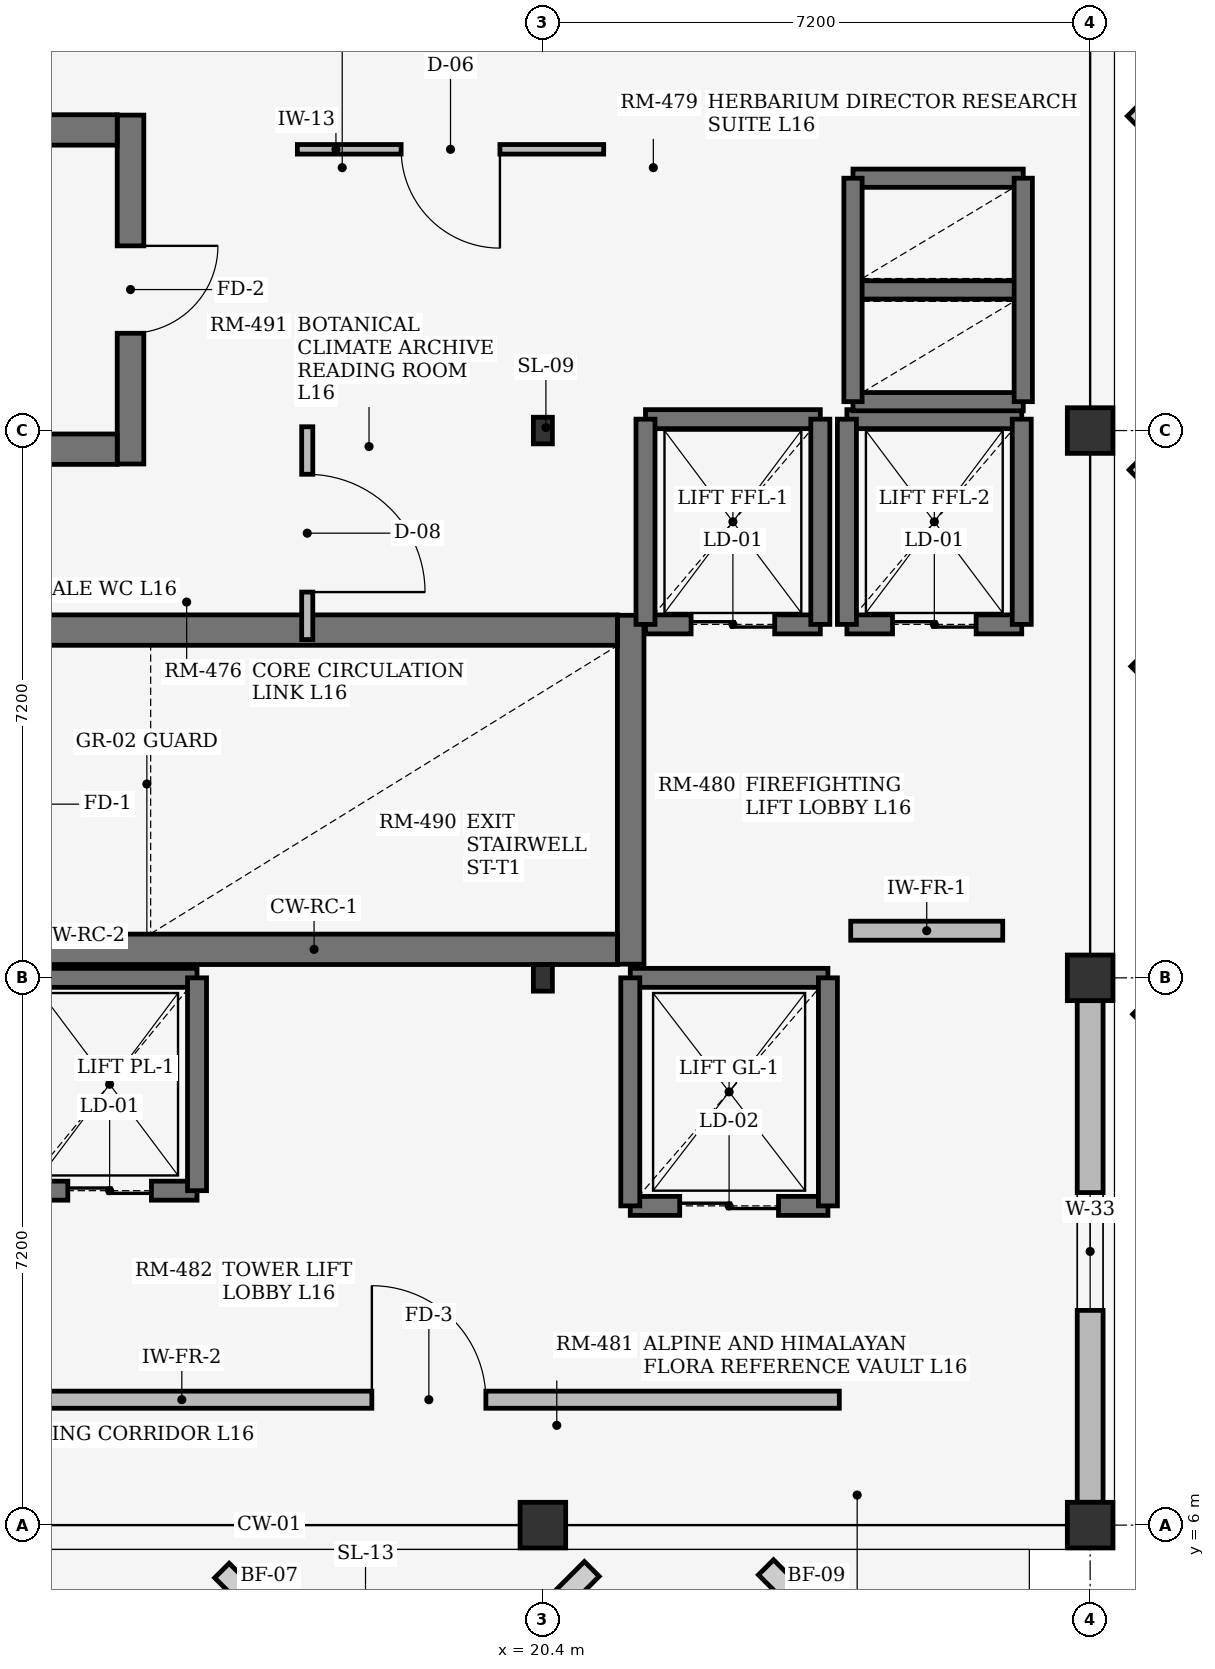
"""IFC4 building model, lengths in metres.
Left out: names, types, materials, properties, quantities, classifications, styles, units other than length and angle.
Written with IfcOpenShell. Run it as: python <this file> out.ifc"""

import sys

from ifc_helpers import new_model, si_unit, direction, frame, frame_2d, origin, origin_2d, place, context, subcontext, project, spatial, rectangle, i_section, extrude, element, fill, save


model = new_model("IFC4")
c1 = context("Model", 3, precision=1e-05, world=origin(), true_north=direction((0.0, 1.0)))
c2 = subcontext(c1, "Body", "Model", "MODEL_VIEW")
j1 = project(units=[si_unit("LENGTHUNIT", "METRE"), si_unit("PLANEANGLEUNIT", "RADIAN")], contexts=[c1])
p1 = place(None, origin())
s1 = spatial("IfcSite", under=j1, at=p1, CompositionType="ELEMENT")
p2 = place(p1, origin())
s2 = spatial("IfcBuilding", under=s1, at=p2, CompositionType="ELEMENT")
p3 = place(p2, frame((0.0, 0.0, 63.15)))
s3 = spatial("IfcBuildingStorey", under=s2, at=p3, CompositionType="ELEMENT", Elevation=63.15)
p4 = place(p3, frame((20.4, 6.0, 0.0), z_axis=(0.0, 0.0, 1.0), x_axis=(1.0, 0.0, 0.0)))
e1 = element("IfcColumn", 1, at=p4, inside=s3, PredefinedType="COLUMN", context=c2, shape_type="SweptSolid", body=[
    extrude(rectangle(XDim=0.6, YDim=0.6, at=origin_2d()), origin(), (0.0, 0.0, 1.0), 3.49),
])
for number, where, z_axis, x_axis in (
    (2, (20.4, 13.2, 0.0), (0.0, 0.0, 1.0), (1.0, 0.0, 0.0)),
    (3, (20.4, 20.4, 0.0), (0.0, 0.0, 1.0), (1.0, 0.0, 0.0)),
):
    element("IfcColumn", number, at=place(p3, frame(where, z_axis=z_axis, x_axis=x_axis)), inside=s3, PredefinedType="COLUMN", context=c2, shape_type="SweptSolid", body=[
        extrude(i_section(OverallWidth=0.25, OverallDepth=0.35, WebThickness=0.01, FlangeThickness=0.012, at=origin_2d()), origin(), (0.0, 0.0, 1.0), 3.49),
    ])
for number, where, z_axis, x_axis in (
    (4, (27.6, 6.0, 0.0), (0.0, 0.0, 1.0), (1.0, 0.0, 0.0)),
    (5, (27.6, 13.2, 0.0), (0.0, 0.0, 1.0), (1.0, 0.0, 0.0)),
    (6, (27.6, 20.4, 0.0), (0.0, 0.0, 1.0), (1.0, 0.0, 0.0)),
):
    element("IfcColumn", number, at=place(p3, frame(where, z_axis=z_axis, x_axis=x_axis)), inside=s3, PredefinedType="COLUMN", context=c2, shape_type="SweptSolid", body=[
        extrude(rectangle(XDim=0.6, YDim=0.6, at=origin_2d()), origin(), (0.0, 0.0, 1.0), 3.49),
    ])
p5 = place(p3, frame((27.6, 6.3, 0.0), z_axis=(0.0, 0.0, 1.0), x_axis=(0.0, 1.0, 0.0)))
e7 = element("IfcWall", 7, at=p5, inside=s3, PredefinedType="STANDARD", context=c2, shape_type="SweptSolid", body=[
    extrude(rectangle(XDim=6.6, YDim=0.34, at=frame_2d((3.3, 0.0))), origin(), (0.0, 0.0, 1.0), 3.07),
])
p6 = place(p5, frame((2.525, 0.0, 0.75)))
e8 = element("IfcOpeningElement", 8, at=p6, cuts=e7, PredefinedType="OPENING", context=c2, shape_type="SweptSolid", body=[
    extrude(rectangle(XDim=1.55, YDim=1.35, at=frame_2d((0.775, 0.675))), frame((0.0, 0.18, 0.0), z_axis=(0.0, -1.0, 0.0), x_axis=(1.0, 0.0, 0.0)), (0.0, 0.0, 1.0), 0.36),
])
p7 = place(p3, frame((21.555, 13.38, 0.0), z_axis=(0.0, 0.0, 1.0), x_axis=(0.0, 1.0, 0.0)))
e9 = element("IfcWall", 9, at=p7, inside=s3, PredefinedType="SHEAR", context=c2, shape_type="SweptSolid", body=[
    extrude(rectangle(XDim=4.59, YDim=0.35, at=frame_2d((2.295, 0.0))), origin(), (0.0, 0.0, 1.0), 3.49),
])
for number, where, z_axis, x_axis in (
    (10, (13.4, 13.575, 0.0), (0.0, 0.0, 1.0), (1.0, 0.0, 0.0)),
    (11, (13.4, 17.775, 0.0), (0.0, 0.0, 1.0), (1.0, 0.0, 0.0)),
):
    element("IfcWall", number, at=place(p3, frame(where, z_axis=z_axis, x_axis=x_axis)), inside=s3, PredefinedType="SHEAR", context=c2, shape_type="SweptSolid", body=[
        extrude(rectangle(XDim=7.98, YDim=0.4, at=frame_2d((3.99, 0.0))), origin(), (0.0, 0.0, 1.0), 3.49),
    ])
p8 = place(p3, frame((14.975, 24.55, 0.0), z_axis=(0.0, 0.0, 1.0), x_axis=(0.0, -1.0, 0.0)))
e12 = element("IfcWall", 12, at=p8, inside=s3, PredefinedType="SHEAR", context=c2, shape_type="SweptSolid", body=[
    extrude(rectangle(XDim=4.59, YDim=0.35, at=frame_2d((2.295, 0.0))), origin(), (0.0, 0.0, 1.0), 3.49),
])
p9 = place(p8, frame((1.72, 0.0, 0.0)))
e13 = element("IfcOpeningElement", 13, at=p9, cuts=e12, PredefinedType="OPENING", context=c2, shape_type="SweptSolid", body=[
    extrude(rectangle(XDim=1.15, YDim=2.2, at=frame_2d((0.575, 1.1))), frame((0.0, 0.185, 0.0), z_axis=(0.0, -1.0, 0.0), x_axis=(1.0, 0.0, 0.0)), (0.0, 0.0, 1.0), 0.37),
])
for number, where, z_axis, x_axis in (
    (14, (14.8, 24.355, 0.0), (0.0, 0.0, 1.0), (-1.0, 0.0, 0.0)),
    (15, (14.8, 20.155, 0.0), (0.0, 0.0, 1.0), (-1.0, 0.0, 0.0)),
):
    element("IfcWall", number, at=place(p3, frame(where, z_axis=z_axis, x_axis=x_axis)), inside=s3, PredefinedType="SHEAR", context=c2, shape_type="SweptSolid", body=[
        extrude(rectangle(XDim=7.98, YDim=0.4, at=frame_2d((3.99, 0.0))), origin(), (0.0, 0.0, 1.0), 3.49),
    ])
p10 = place(p3, frame((21.75, 17.85, 0.0), z_axis=(0.0, 0.0, 1.0), x_axis=(1.0, 0.0, 0.0)))
e16 = element("IfcWall", 16, at=p10, inside=s3, PredefinedType="SHEAR", context=c2, shape_type="SweptSolid", body=[
    extrude(rectangle(XDim=2.3, YDim=0.25, at=frame_2d((1.15, 0.0))), origin(), (0.0, 0.0, 1.0), 3.49),
])
p11 = place(p10, frame((0.6, 0.0, 0.0)))
e17 = element("IfcOpeningElement", 17, at=p11, cuts=e16, PredefinedType="OPENING", context=c2, shape_type="SweptSolid", body=[
    extrude(rectangle(XDim=1.1, YDim=2.2, at=frame_2d((0.55, 1.1))), frame((0.0, 0.135, 0.0), z_axis=(0.0, -1.0, 0.0), x_axis=(1.0, 0.0, 0.0)), (0.0, 0.0, 1.0), 0.27),
])
p12 = place(p3, frame((21.75, 20.55, 0.0), z_axis=(0.0, 0.0, 1.0), x_axis=(1.0, 0.0, 0.0)))
e18 = element("IfcWall", 18, at=p12, inside=s3, PredefinedType="SHEAR", context=c2, shape_type="SweptSolid", body=[
    extrude(rectangle(XDim=2.3, YDim=0.25, at=frame_2d((1.15, 0.0))), origin(), (0.0, 0.0, 1.0), 3.49),
])
for number, where, z_axis, x_axis in (
    (19, (21.75, 17.85, 0.0), (0.0, 0.0, 1.0), (0.0, 1.0, 0.0)),
    (20, (24.05, 17.85, 0.0), (0.0, 0.0, 1.0), (0.0, 1.0, 0.0)),
):
    element("IfcWall", number, at=place(p3, frame(where, z_axis=z_axis, x_axis=x_axis)), inside=s3, PredefinedType="SHEAR", context=c2, shape_type="SweptSolid", body=[
        extrude(rectangle(XDim=2.7, YDim=0.25, at=frame_2d((1.35, 0.0))), origin(), (0.0, 0.0, 1.0), 3.49),
    ])
p13 = place(p3, frame((24.4, 17.85, 0.0), z_axis=(0.0, 0.0, 1.0), x_axis=(1.0, 0.0, 0.0)))
e21 = element("IfcWall", 21, at=p13, inside=s3, PredefinedType="SHEAR", context=c2, shape_type="SweptSolid", body=[
    extrude(rectangle(XDim=2.3, YDim=0.25, at=frame_2d((1.15, 0.0))), origin(), (0.0, 0.0, 1.0), 3.49),
])
p14 = place(p13, frame((0.6, 0.0, 0.0)))
e22 = element("IfcOpeningElement", 22, at=p14, cuts=e21, PredefinedType="OPENING", context=c2, shape_type="SweptSolid", body=[
    extrude(rectangle(XDim=1.1, YDim=2.2, at=frame_2d((0.55, 1.1))), frame((0.0, 0.135, 0.0), z_axis=(0.0, -1.0, 0.0), x_axis=(1.0, 0.0, 0.0)), (0.0, 0.0, 1.0), 0.27),
])
p15 = place(p3, frame((24.4, 20.55, 0.0), z_axis=(0.0, 0.0, 1.0), x_axis=(1.0, 0.0, 0.0)))
e23 = element("IfcWall", 23, at=p15, inside=s3, PredefinedType="SHEAR", context=c2, shape_type="SweptSolid", body=[
    extrude(rectangle(XDim=2.3, YDim=0.25, at=frame_2d((1.15, 0.0))), origin(), (0.0, 0.0, 1.0), 3.49),
])
for number, where, z_axis, x_axis in (
    (24, (24.4, 17.85, 0.0), (0.0, 0.0, 1.0), (0.0, 1.0, 0.0)),
    (25, (26.7, 17.85, 0.0), (0.0, 0.0, 1.0), (0.0, 1.0, 0.0)),
):
    element("IfcWall", number, at=place(p3, frame(where, z_axis=z_axis, x_axis=x_axis)), inside=s3, PredefinedType="SHEAR", context=c2, shape_type="SweptSolid", body=[
        extrude(rectangle(XDim=2.7, YDim=0.25, at=frame_2d((1.35, 0.0))), origin(), (0.0, 0.0, 1.0), 3.49),
    ])
p16 = place(p3, frame((13.55, 10.4, 0.0), z_axis=(0.0, 0.0, 1.0), x_axis=(1.0, 0.0, 0.0)))
e26 = element("IfcWall", 26, at=p16, inside=s3, PredefinedType="SHEAR", context=c2, shape_type="SweptSolid", body=[
    extrude(rectangle(XDim=2.3, YDim=0.25, at=frame_2d((1.15, 0.0))), origin(), (0.0, 0.0, 1.0), 3.49),
])
p17 = place(p16, frame((0.6, 0.0, 0.0)))
e27 = element("IfcOpeningElement", 27, at=p17, cuts=e26, PredefinedType="OPENING", context=c2, shape_type="SweptSolid", body=[
    extrude(rectangle(XDim=1.1, YDim=2.2, at=frame_2d((0.55, 1.1))), frame((0.0, 0.135, 0.0), z_axis=(0.0, -1.0, 0.0), x_axis=(1.0, 0.0, 0.0)), (0.0, 0.0, 1.0), 0.27),
])
p18 = place(p3, frame((13.55, 13.2, 0.0), z_axis=(0.0, 0.0, 1.0), x_axis=(1.0, 0.0, 0.0)))
e28 = element("IfcWall", 28, at=p18, inside=s3, PredefinedType="SHEAR", context=c2, shape_type="SweptSolid", body=[
    extrude(rectangle(XDim=2.3, YDim=0.25, at=frame_2d((1.15, 0.0))), origin(), (0.0, 0.0, 1.0), 3.49),
])
p19 = place(p3, frame((15.85, 10.4, 0.0), z_axis=(0.0, 0.0, 1.0), x_axis=(0.0, 1.0, 0.0)))
e29 = element("IfcWall", 29, at=p19, inside=s3, PredefinedType="SHEAR", context=c2, shape_type="SweptSolid", body=[
    extrude(rectangle(XDim=2.8, YDim=0.25, at=frame_2d((1.4, 0.0))), origin(), (0.0, 0.0, 1.0), 3.49),
])
p20 = place(p3, frame((21.55, 10.2, 0.0), z_axis=(0.0, 0.0, 1.0), x_axis=(1.0, 0.0, 0.0)))
e30 = element("IfcWall", 30, at=p20, inside=s3, PredefinedType="SHEAR", context=c2, shape_type="SweptSolid", body=[
    extrude(rectangle(XDim=2.6, YDim=0.25, at=frame_2d((1.3, 0.0))), origin(), (0.0, 0.0, 1.0), 3.49),
])
p21 = place(p20, frame((0.65, 0.0, 0.0)))
e31 = element("IfcOpeningElement", 31, at=p21, cuts=e30, PredefinedType="OPENING", context=c2, shape_type="SweptSolid", body=[
    extrude(rectangle(XDim=1.3, YDim=2.25, at=frame_2d((0.65, 1.125))), frame((0.0, 0.135, 0.0), z_axis=(0.0, -1.0, 0.0), x_axis=(1.0, 0.0, 0.0)), (0.0, 0.0, 1.0), 0.27),
])
p22 = place(p3, frame((21.55, 13.2, 0.0), z_axis=(0.0, 0.0, 1.0), x_axis=(1.0, 0.0, 0.0)))
e32 = element("IfcWall", 32, at=p22, inside=s3, PredefinedType="SHEAR", context=c2, shape_type="SweptSolid", body=[
    extrude(rectangle(XDim=2.6, YDim=0.25, at=frame_2d((1.3, 0.0))), origin(), (0.0, 0.0, 1.0), 3.49),
])
for number, where, z_axis, x_axis in (
    (33, (21.55, 10.2, 0.0), (0.0, 0.0, 1.0), (0.0, 1.0, 0.0)),
    (34, (24.15, 10.2, 0.0), (0.0, 0.0, 1.0), (0.0, 1.0, 0.0)),
):
    element("IfcWall", number, at=place(p3, frame(where, z_axis=z_axis, x_axis=x_axis)), inside=s3, PredefinedType="SHEAR", context=c2, shape_type="SweptSolid", body=[
        extrude(rectangle(XDim=3.0, YDim=0.25, at=frame_2d((1.5, 0.0))), origin(), (0.0, 0.0, 1.0), 3.49),
    ])
for number, where, z_axis, x_axis in (
    (35, (24.48, 20.78, 0.0), (0.0, 0.0, 1.0), (1.0, 0.0, 0.0)),
    (36, (24.48, 22.25, 0.0), (0.0, 0.0, 1.0), (1.0, 0.0, 0.0)),
    (37, (24.48, 23.72, 0.0), (0.0, 0.0, 1.0), (1.0, 0.0, 0.0)),
):
    element("IfcWall", number, at=place(p3, frame(where, z_axis=z_axis, x_axis=x_axis)), inside=s3, PredefinedType="SHEAR", context=c2, shape_type="SweptSolid", body=[
        extrude(rectangle(XDim=2.24, YDim=0.24, at=frame_2d((1.12, 0.0))), origin(), (0.0, 0.0, 1.0), 3.49),
    ])
for number, where, z_axis, x_axis in (
    (38, (24.48, 20.78, 0.0), (0.0, 0.0, 1.0), (0.0, 1.0, 0.0)),
    (39, (26.72, 20.78, 0.0), (0.0, 0.0, 1.0), (0.0, 1.0, 0.0)),
):
    element("IfcWall", number, at=place(p3, frame(where, z_axis=z_axis, x_axis=x_axis)), inside=s3, PredefinedType="SHEAR", context=c2, shape_type="SweptSolid", body=[
        extrude(rectangle(XDim=2.94, YDim=0.24, at=frame_2d((1.47, 0.0))), origin(), (0.0, 0.0, 1.0), 3.49),
    ])
p23 = place(p3, frame((24.45, 13.82, 0.0), z_axis=(0.0, 0.0, 1.0), x_axis=(1.0, 0.0, 0.0)))
e40 = element("IfcWall", 40, at=p23, inside=s3, PredefinedType="SOLIDWALL", context=c2, shape_type="SweptSolid", body=[
    extrude(rectangle(XDim=2.0, YDim=0.25, at=frame_2d((1.0, 0.0))), origin(), (0.0, 0.0, 1.0), 3.47),
])
p24 = place(p3, frame((17.17, 24.1, 0.0), z_axis=(0.0, 0.0, 1.0), x_axis=(1.0, 0.0, 0.0)))
e41 = element("IfcWall", 41, at=p24, inside=s3, PredefinedType="PARTITIONING", context=c2, shape_type="SweptSolid", body=[
    extrude(rectangle(XDim=4.03, YDim=0.126, at=frame_2d((2.015, 0.0))), origin(), (0.0, 0.0, 1.0), 3.47),
])
p25 = place(p24, frame((1.365, 0.0, 0.0)))
e42 = element("IfcOpeningElement", 42, at=p25, cuts=e41, PredefinedType="OPENING", context=c2, shape_type="SweptSolid", body=[
    extrude(rectangle(XDim=1.3, YDim=2.2, at=frame_2d((0.65, 1.1))), frame((0.0, 0.073, 0.0), z_axis=(0.0, -1.0, 0.0), x_axis=(1.0, 0.0, 0.0)), (0.0, 0.0, 1.0), 0.146),
])
p26 = place(p3, frame((13.5, 7.65, 0.0), z_axis=(0.0, 0.0, 1.0), x_axis=(1.0, 0.0, 0.0)))
e43 = element("IfcWall", 43, at=p26, inside=s3, PredefinedType="SOLIDWALL", context=c2, shape_type="SweptSolid", body=[
    extrude(rectangle(XDim=10.8, YDim=0.225, at=frame_2d((5.4, 0.0))), origin(), (0.0, 0.0, 1.0), 3.47),
])
p27 = place(p26, frame((4.65, 0.0, 0.0)))
e44 = element("IfcOpeningElement", 44, at=p27, cuts=e43, PredefinedType="OPENING", context=c2, shape_type="SweptSolid", body=[
    extrude(rectangle(XDim=1.5, YDim=2.2, at=frame_2d((0.75, 1.1))), frame((0.0, 0.123, 0.0), z_axis=(0.0, -1.0, 0.0), x_axis=(1.0, 0.0, 0.0)), (0.0, 0.0, 1.0), 0.245),
])
p28 = place(p3, frame((17.3, 17.65, 0.0), z_axis=(0.0, 0.0, 1.0), x_axis=(0.0, 1.0, 0.0)))
e45 = element("IfcWall", 45, at=p28, inside=s3, PredefinedType="PARTITIONING", context=c2, shape_type="SweptSolid", body=[
    extrude(rectangle(XDim=2.8, YDim=0.146, at=frame_2d((1.4, 0.0))), origin(), (0.0, 0.0, 1.0), 3.47),
])
p29 = place(p28, frame((0.625, 0.0, 0.0)))
e46 = element("IfcOpeningElement", 46, at=p29, cuts=e45, PredefinedType="OPENING", context=c2, shape_type="SweptSolid", body=[
    extrude(rectangle(XDim=1.55, YDim=2.25, at=frame_2d((0.775, 1.125))), frame((0.0, 0.083, 0.0), z_axis=(0.0, -1.0, 0.0), x_axis=(1.0, 0.0, 0.0)), (0.0, 0.0, 1.0), 0.166),
])
p30 = place(p6, origin())
e47 = element("IfcWindow", 47, at=p30, inside=s3, PartitioningType="SINGLE_PANEL", PredefinedType="WINDOW", context=c2, shape_type="SweptSolid", body=[
    extrude(rectangle(XDim=1.55, YDim=1.35, at=frame_2d((0.775, 0.675))), frame((0.0, 0.03, 0.0), z_axis=(0.0, -1.0, 0.0), x_axis=(1.0, 0.0, 0.0)), (0.0, 0.0, 1.0), 0.06),
])
fill(e8, e47)
p31 = place(p9, origin())
e48 = element("IfcDoor", 48, at=p31, inside=s3, OperationType="SINGLE_SWING_LEFT", PredefinedType="DOOR", context=c2, shape_type="SweptSolid", body=[
    extrude(rectangle(XDim=1.15, YDim=2.2, at=frame_2d((0.575, 1.1))), frame((0.0, 0.025, 0.0), z_axis=(0.0, -1.0, 0.0), x_axis=(1.0, 0.0, 0.0)), (0.0, 0.0, 1.0), 0.05),
])
fill(e13, e48)
p32 = place(p11, origin())
e49 = element("IfcDoor", 49, at=p32, inside=s3, OperationType="DOUBLE_DOOR_SLIDING", PredefinedType="DOOR", context=c2, shape_type="SweptSolid", body=[
    extrude(rectangle(XDim=1.1, YDim=2.2, at=frame_2d((0.55, 1.1))), frame((0.0, 0.025, 0.0), z_axis=(0.0, -1.0, 0.0), x_axis=(1.0, 0.0, 0.0)), (0.0, 0.0, 1.0), 0.05),
])
fill(e17, e49)
p33 = place(p14, origin())
e50 = element("IfcDoor", 50, at=p33, inside=s3, OperationType="DOUBLE_DOOR_SLIDING", PredefinedType="DOOR", context=c2, shape_type="SweptSolid", body=[
    extrude(rectangle(XDim=1.1, YDim=2.2, at=frame_2d((0.55, 1.1))), frame((0.0, 0.025, 0.0), z_axis=(0.0, -1.0, 0.0), x_axis=(1.0, 0.0, 0.0)), (0.0, 0.0, 1.0), 0.05),
])
fill(e22, e50)
p34 = place(p17, origin())
e51 = element("IfcDoor", 51, at=p34, inside=s3, OperationType="DOUBLE_DOOR_SLIDING", PredefinedType="DOOR", context=c2, shape_type="SweptSolid", body=[
    extrude(rectangle(XDim=1.1, YDim=2.2, at=frame_2d((0.55, 1.1))), frame((0.0, 0.025, 0.0), z_axis=(0.0, -1.0, 0.0), x_axis=(1.0, 0.0, 0.0)), (0.0, 0.0, 1.0), 0.05),
])
fill(e27, e51)
p35 = place(p21, origin())
e52 = element("IfcDoor", 52, at=p35, inside=s3, OperationType="DOUBLE_DOOR_SLIDING", PredefinedType="DOOR", context=c2, shape_type="SweptSolid", body=[
    extrude(rectangle(XDim=1.3, YDim=2.25, at=frame_2d((0.65, 1.125))), frame((0.0, 0.025, 0.0), z_axis=(0.0, -1.0, 0.0), x_axis=(1.0, 0.0, 0.0)), (0.0, 0.0, 1.0), 0.05),
])
fill(e31, e52)
p36 = place(p25, origin())
e53 = element("IfcDoor", 53, at=p36, inside=s3, OperationType="SINGLE_SWING_RIGHT", PredefinedType="DOOR", context=c2, shape_type="SweptSolid", body=[
    extrude(rectangle(XDim=1.3, YDim=2.2, at=frame_2d((0.65, 1.1))), frame((0.0, 0.025, 0.0), z_axis=(0.0, -1.0, 0.0), x_axis=(1.0, 0.0, 0.0)), (0.0, 0.0, 1.0), 0.05),
])
fill(e42, e53)
p37 = place(p27, origin())
e54 = element("IfcDoor", 54, at=p37, inside=s3, OperationType="SINGLE_SWING_LEFT", PredefinedType="DOOR", context=c2, shape_type="SweptSolid", body=[
    extrude(rectangle(XDim=1.5, YDim=2.2, at=frame_2d((0.75, 1.1))), frame((0.0, 0.025, 0.0), z_axis=(0.0, -1.0, 0.0), x_axis=(1.0, 0.0, 0.0)), (0.0, 0.0, 1.0), 0.05),
])
fill(e44, e54)
p38 = place(p29, frame((1.55, 0.0, 0.0), z_axis=(0.0, 0.0, 1.0), x_axis=(-1.0, 0.0, 0.0)))
e55 = element("IfcDoor", 55, at=p38, inside=s3, OperationType="DOUBLE_DOOR_SINGLE_SWING", PredefinedType="DOOR", context=c2, shape_type="SweptSolid", body=[
    extrude(rectangle(XDim=1.55, YDim=2.25, at=frame_2d((0.775, 1.125))), frame((0.0, 0.025, 0.0), z_axis=(0.0, -1.0, 0.0), x_axis=(1.0, 0.0, 0.0)), (0.0, 0.0, 1.0), 0.05),
])
fill(e46, e55)
save(model, sys.argv[1])
